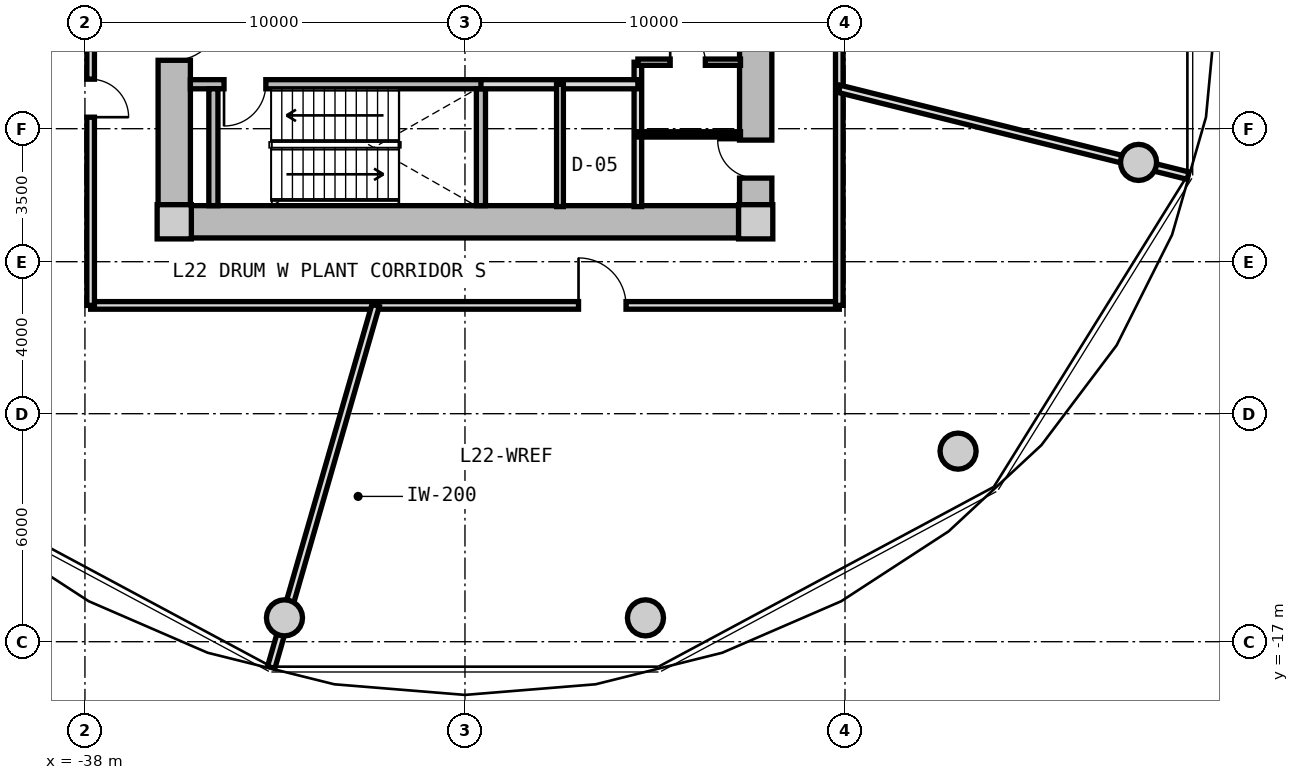
"""IFC4 building model, lengths in metres.
Left out: names, types, materials, properties, quantities, classifications, styles, units other than length and angle.
Written with IfcOpenShell. Run it as: python <this file> out.ifc"""

import sys

from ifc_helpers import new_model, si_unit, direction, frame, frame_2d, origin, origin_2d, place, context, subcontext, project, spatial, rectangle, circle, extrude, source, transform, mapped, element, fill, save


model = new_model("IFC4")
c1 = context("Model", 3, precision=1e-05, world=origin(), true_north=direction((0.0, 1.0)))
c2 = subcontext(c1, "Body", "Model", "MODEL_VIEW")
j1 = project(units=[si_unit("LENGTHUNIT", "METRE"), si_unit("PLANEANGLEUNIT", "RADIAN")], contexts=[c1])
p1 = place(None, origin())
s1 = spatial("IfcSite", under=j1, at=p1, CompositionType="ELEMENT")
p2 = place(p1, origin())
s2 = spatial("IfcBuilding", under=s1, at=p2, CompositionType="ELEMENT")
p3 = place(p2, frame((0.0, 0.0, 73.45)))
s3 = spatial("IfcBuildingStorey", under=s2, at=p3, CompositionType="ELEMENT", Elevation=73.45)
m1 = source(origin(), c2, "Body", "SweptSolid", [
    extrude(rectangle(XDim=0.9, YDim=0.9, at=origin_2d()), origin(), (0.0, 0.0, 1.0), 4.5),
])
for number, where, z_axis, x_axis in (
    (1, (-35.65, -5.95, 0.0), (0.0, 0.0, 1.0), (1.0, 0.0, 0.0)),
    (2, (-20.35, -5.95, 0.0), (0.0, 0.0, 1.0), (1.0, 0.0, 0.0)),
):
    element("IfcColumn", number, at=place(p3, frame(where, z_axis=z_axis, x_axis=x_axis)), inside=s3, PredefinedType="COLUMN", context=c2, shape_type="MappedRepresentation", body=[
        mapped(m1, transform((0.0, 0.0, 0.0), x_axis=(1.0, 0.0, 0.0), y_axis=(0.0, 1.0, 0.0), z_axis=(0.0, 0.0, 1.0), scale=1.0)),
    ])
m2 = source(origin(), c2, "Body", "SweptSolid", [
    extrude(rectangle(XDim=14.4, YDim=0.85, at=frame_2d((7.2, 0.0))), origin(), (0.0, 0.0, 1.0), 4.08),
])
p4 = place(p3, frame((-20.8, -5.95, 0.0), z_axis=(0.0, 0.0, 1.0), x_axis=(-1.0, 0.0, 0.0)))
e3 = element("IfcWall", 3, at=p4, inside=s3, PredefinedType="SHEAR", context=c2, shape_type="MappedRepresentation", body=[
    mapped(m2, transform((0.0, 0.0, 0.0), x_axis=(1.0, 0.0, 0.0), y_axis=(0.0, 1.0, 0.0), z_axis=(0.0, 0.0, 1.0), scale=1.0)),
])
m3 = source(origin(), c2, "Body", "SweptSolid", [
    extrude(rectangle(XDim=11.0, YDim=0.85, at=frame_2d((5.5, 0.0))), origin(), (0.0, 0.0, 1.0), 4.08),
])
p5 = place(p3, frame((-35.65, -5.5, 0.0), z_axis=(0.0, 0.0, 1.0), x_axis=(0.0, 1.0, 0.0)))
e4 = element("IfcWall", 4, at=p5, inside=s3, PredefinedType="SHEAR", context=c2, shape_type="MappedRepresentation", body=[
    mapped(m3, transform((0.0, 0.0, 0.0), x_axis=(1.0, 0.0, 0.0), y_axis=(0.0, 1.0, 0.0), z_axis=(0.0, 0.0, 1.0), scale=1.0)),
])
p6 = place(p5, frame((3.8, 0.0, 0.0)))
e5 = element("IfcOpeningElement", 5, at=p6, cuts=e4, PredefinedType="OPENING", context=c2, shape_type="SweptSolid", body=[
    extrude(rectangle(XDim=1.2, YDim=2.15, at=frame_2d((0.6, 1.075))), frame((0.0, 0.435, 0.0), z_axis=(0.0, -1.0, 0.0), x_axis=(1.0, 0.0, 0.0)), (0.0, 0.0, 1.0), 0.87),
])
p7 = place(p3, frame((-20.35, 5.5, 0.0), z_axis=(0.0, 0.0, 1.0), x_axis=(0.0, -1.0, 0.0)))
e6 = element("IfcWall", 6, at=p7, inside=s3, PredefinedType="SHEAR", context=c2, shape_type="MappedRepresentation", body=[
    mapped(m3, transform((0.0, 0.0, 0.0), x_axis=(1.0, 0.0, 0.0), y_axis=(0.0, 1.0, 0.0), z_axis=(0.0, 0.0, 1.0), scale=1.0)),
])
p8 = place(p7, frame((5.65, 0.0, 0.0)))
e7 = element("IfcOpeningElement", 7, at=p8, cuts=e6, PredefinedType="OPENING", context=c2, shape_type="SweptSolid", body=[
    extrude(rectangle(XDim=1.2, YDim=2.15, at=frame_2d((0.6, 1.075))), frame((0.0, 0.435, 0.0), z_axis=(0.0, -1.0, 0.0), x_axis=(1.0, 0.0, 0.0)), (0.0, 0.0, 1.0), 0.87),
])
p9 = place(p7, frame((9.3, 0.0, 0.0)))
e8 = element("IfcOpeningElement", 8, at=p9, cuts=e6, PredefinedType="OPENING", context=c2, shape_type="SweptSolid", body=[
    extrude(rectangle(XDim=1.0, YDim=2.1, at=frame_2d((0.5, 1.05))), frame((0.0, 0.435, 0.0), z_axis=(0.0, -1.0, 0.0), x_axis=(1.0, 0.0, 0.0)), (0.0, 0.0, 1.0), 0.87),
])
m4 = source(origin(), c2, "Body", "SweptSolid", [
    extrude(circle(Radius=0.475, at=origin_2d()), origin(), (0.0, 0.0, 1.0), 4.08),
])
for number, where, z_axis, x_axis in (
    (9, (-32.749, -16.373, 0.0), (0.0, 0.0, 1.0), (1.0, 0.0, 0.0)),
    (10, (-23.251, -16.373, 0.0), (0.0, 0.0, 1.0), (1.0, 0.0, 0.0)),
    (11, (-15.025, -11.985, 0.0), (0.0, 0.0, 1.0), (1.0, 0.0, 0.0)),
    (12, (-10.275, -4.387, 0.0), (0.0, 0.0, 1.0), (1.0, 0.0, 0.0)),
):
    element("IfcColumn", number, at=place(p3, frame(where, z_axis=z_axis, x_axis=x_axis)), inside=s3, PredefinedType="COLUMN", context=c2, shape_type="MappedRepresentation", body=[
        mapped(m4, transform((0.0, 0.0, 0.0), x_axis=(1.0, 0.0, 0.0), y_axis=(0.0, 1.0, 0.0), z_axis=(0.0, 0.0, 1.0), scale=1.0)),
    ])
m5 = source(origin(), c2, "Body", "SweptSolid", [
    extrude(rectangle(XDim=7.765, YDim=0.24, at=frame_2d((3.883, 0.0))), origin(), (0.0, 0.0, 1.0), 4.08),
])
p10 = place(p3, frame((-35.225, -2.33, 0.0), z_axis=(0.0, 0.0, 1.0), x_axis=(1.0, 0.0, 0.0)))
e13 = element("IfcWall", 13, at=p10, inside=s3, PredefinedType="PARTITIONING", context=c2, shape_type="MappedRepresentation", body=[
    mapped(m5, transform((0.0, 0.0, 0.0), x_axis=(1.0, 0.0, 0.0), y_axis=(0.0, 1.0, 0.0), z_axis=(0.0, 0.0, 1.0), scale=1.0)),
])
p11 = place(p10, frame((0.885, 0.0, 0.0)))
e14 = element("IfcOpeningElement", 14, at=p11, cuts=e13, PredefinedType="OPENING", context=c2, shape_type="SweptSolid", body=[
    extrude(rectangle(XDim=1.1, YDim=2.15, at=frame_2d((0.55, 1.075))), frame((0.0, 0.13, 0.0), z_axis=(0.0, -1.0, 0.0), x_axis=(1.0, 0.0, 0.0)), (0.0, 0.0, 1.0), 0.26),
])
m6 = source(origin(), c2, "Body", "SweptSolid", [
    extrude(rectangle(XDim=3.075, YDim=0.24, at=frame_2d((1.538, 0.0))), origin(), (0.0, 0.0, 1.0), 4.08),
])
for number, where, z_axis, x_axis in (
    (15, (-34.62, -5.525, 0.0), (0.0, 0.0, 1.0), (0.0, 1.0, 0.0)),
    (16, (-27.58, -5.525, 0.0), (0.0, 0.0, 1.0), (0.0, 1.0, 0.0)),
):
    element("IfcWall", number, at=place(p3, frame(where, z_axis=z_axis, x_axis=x_axis)), inside=s3, PredefinedType="PARTITIONING", context=c2, shape_type="MappedRepresentation", body=[
        mapped(m6, transform((0.0, 0.0, 0.0), x_axis=(1.0, 0.0, 0.0), y_axis=(0.0, 1.0, 0.0), z_axis=(0.0, 0.0, 1.0), scale=1.0)),
    ])
m7 = source(origin(), c2, "Body", "SweptSolid", [
    extrude(rectangle(XDim=3.8, YDim=0.2, at=frame_2d((1.9, 0.0))), origin(), (0.0, 0.0, 1.0), 4.065),
])
p12 = place(p3, frame((-23.45, -5.55, 0.0), z_axis=(0.0, 0.0, 1.0), x_axis=(0.0, 1.0, 0.0)))
e17 = element("IfcWall", 17, at=p12, inside=s3, PredefinedType="PARTITIONING", context=c2, shape_type="MappedRepresentation", body=[
    mapped(m7, transform((0.0, 0.0, 0.0), x_axis=(1.0, 0.0, 0.0), y_axis=(0.0, 1.0, 0.0), z_axis=(0.0, 0.0, 1.0), scale=1.0)),
])
m8 = source(origin(), c2, "Body", "SweptSolid", [
    extrude(rectangle(XDim=4.13, YDim=0.24, at=frame_2d((2.065, 0.0))), origin(), (0.0, 0.0, 1.0), 4.065),
])
p13 = place(p3, frame((-27.58, -2.33, 0.0), z_axis=(0.0, 0.0, 1.0), x_axis=(1.0, 0.0, 0.0)))
e18 = element("IfcWall", 18, at=p13, inside=s3, PredefinedType="PARTITIONING", context=c2, shape_type="MappedRepresentation", body=[
    mapped(m8, transform((0.0, 0.0, 0.0), x_axis=(1.0, 0.0, 0.0), y_axis=(0.0, 1.0, 0.0), z_axis=(0.0, 0.0, 1.0), scale=1.0)),
])
m9 = source(origin(), c2, "Body", "SweptSolid", [
    extrude(rectangle(XDim=3.22, YDim=0.18, at=frame_2d((1.61, 0.0))), origin(), (0.0, 0.0, 1.0), 4.065),
])
p14 = place(p3, frame((-25.5, -5.55, 0.0), z_axis=(0.0, 0.0, 1.0), x_axis=(0.0, 1.0, 0.0)))
e19 = element("IfcWall", 19, at=p14, inside=s3, PredefinedType="PARTITIONING", context=c2, shape_type="MappedRepresentation", body=[
    mapped(m9, transform((0.0, 0.0, 0.0), x_axis=(1.0, 0.0, 0.0), y_axis=(0.0, 1.0, 0.0), z_axis=(0.0, 0.0, 1.0), scale=1.0)),
])
m10 = source(origin(), c2, "Body", "SweptSolid", [
    extrude(rectangle(XDim=2.7, YDim=0.165, at=frame_2d((1.35, 0.0))), origin(), (0.0, 0.0, 1.0), 4.065),
])
p15 = place(p3, frame((-23.45, -1.75, 0.0), z_axis=(0.0, 0.0, 1.0), x_axis=(1.0, 0.0, 0.0)))
e20 = element("IfcWall", 20, at=p15, inside=s3, PredefinedType="PARTITIONING", context=c2, shape_type="MappedRepresentation", body=[
    mapped(m10, transform((0.0, 0.0, 0.0), x_axis=(1.0, 0.0, 0.0), y_axis=(0.0, 1.0, 0.0), z_axis=(0.0, 0.0, 1.0), scale=1.0)),
])
p16 = place(p15, frame((0.85, 0.0, 0.0)))
e21 = element("IfcOpeningElement", 21, at=p16, cuts=e20, PredefinedType="OPENING", context=c2, shape_type="SweptSolid", body=[
    extrude(rectangle(XDim=0.925, YDim=2.1, at=frame_2d((0.462, 1.05))), frame((0.0, 0.093, 0.0), z_axis=(0.0, -1.0, 0.0), x_axis=(1.0, 0.0, 0.0)), (0.0, 0.0, 1.0), 0.185),
])
m11 = source(origin(), c2, "Body", "SweptSolid", [
    extrude(rectangle(XDim=2.7, YDim=0.14, at=frame_2d((1.35, 0.0))), origin(), (0.0, 0.0, 1.0), 4.065),
])
p17 = place(p3, frame((-23.45, -3.65, 0.0), z_axis=(0.0, 0.0, 1.0), x_axis=(1.0, 0.0, 0.0)))
e22 = element("IfcWall", 22, at=p17, inside=s3, PredefinedType="PARTITIONING", context=c2, shape_type="MappedRepresentation", body=[
    mapped(m11, transform((0.0, 0.0, 0.0), x_axis=(1.0, 0.0, 0.0), y_axis=(0.0, 1.0, 0.0), z_axis=(0.0, 0.0, 1.0), scale=1.0)),
])
m12 = source(origin(), c2, "Body", "SweptSolid", [
    extrude(rectangle(XDim=19.7, YDim=0.2, at=frame_2d((9.85, 0.0))), origin(), (0.0, 0.0, 1.0), 4.065),
])
p18 = place(p3, frame((-18.15, -8.15, 0.0), z_axis=(0.0, 0.0, 1.0), x_axis=(-1.0, 0.0, 0.0)))
e23 = element("IfcWall", 23, at=p18, inside=s3, PredefinedType="PARTITIONING", context=c2, shape_type="MappedRepresentation", body=[
    mapped(m12, transform((0.0, 0.0, 0.0), x_axis=(1.0, 0.0, 0.0), y_axis=(0.0, 1.0, 0.0), z_axis=(0.0, 0.0, 1.0), scale=1.0)),
])
p19 = place(p18, frame((5.612, 0.0, 0.0)))
e24 = element("IfcOpeningElement", 24, at=p19, cuts=e23, PredefinedType="OPENING", context=c2, shape_type="SweptSolid", body=[
    extrude(rectangle(XDim=1.25, YDim=2.2, at=frame_2d((0.625, 1.1))), frame((0.0, 0.11, 0.0), z_axis=(0.0, -1.0, 0.0), x_axis=(1.0, 0.0, 0.0)), (0.0, 0.0, 1.0), 0.22),
])
m13 = source(origin(), c2, "Body", "SweptSolid", [
    extrude(rectangle(XDim=16.3, YDim=0.2, at=frame_2d((8.15, 0.0))), origin(), (0.0, 0.0, 1.0), 4.065),
])
p20 = place(p3, frame((-37.85, -8.15, 0.0), z_axis=(0.0, 0.0, 1.0), x_axis=(0.0, 1.0, 0.0)))
e25 = element("IfcWall", 25, at=p20, inside=s3, PredefinedType="PARTITIONING", context=c2, shape_type="MappedRepresentation", body=[
    mapped(m13, transform((0.0, 0.0, 0.0), x_axis=(1.0, 0.0, 0.0), y_axis=(0.0, 1.0, 0.0), z_axis=(0.0, 0.0, 1.0), scale=1.0)),
])
p21 = place(p20, frame((4.953, 0.0, 0.0)))
e26 = element("IfcOpeningElement", 26, at=p21, cuts=e25, PredefinedType="OPENING", context=c2, shape_type="SweptSolid", body=[
    extrude(rectangle(XDim=1.0, YDim=2.1, at=frame_2d((0.5, 1.05))), frame((0.0, 0.11, 0.0), z_axis=(0.0, -1.0, 0.0), x_axis=(1.0, 0.0, 0.0)), (0.0, 0.0, 1.0), 0.22),
])
p22 = place(p3, frame((-18.15, 8.15, 0.0), z_axis=(0.0, 0.0, 1.0), x_axis=(0.0, -1.0, 0.0)))
e27 = element("IfcWall", 27, at=p22, inside=s3, PredefinedType="PARTITIONING", context=c2, shape_type="MappedRepresentation", body=[
    mapped(m13, transform((0.0, 0.0, 0.0), x_axis=(1.0, 0.0, 0.0), y_axis=(0.0, 1.0, 0.0), z_axis=(0.0, 0.0, 1.0), scale=1.0)),
])
p23 = place(p22, frame((4.953, 0.0, 0.0)))
e28 = element("IfcOpeningElement", 28, at=p23, cuts=e27, PredefinedType="OPENING", context=c2, shape_type="SweptSolid", body=[
    extrude(rectangle(XDim=1.0, YDim=2.1, at=frame_2d((0.5, 1.05))), frame((0.0, 0.11, 0.0), z_axis=(0.0, -1.0, 0.0), x_axis=(1.0, 0.0, 0.0)), (0.0, 0.0, 1.0), 0.22),
])
m14 = source(origin(), c2, "Body", "SweptSolid", [
    extrude(rectangle(XDim=9.915, YDim=0.2, at=frame_2d((4.958, 0.0))), origin(), (0.0, 0.0, 1.0), 4.065),
])
p24 = place(p3, frame((-30.351, -8.15, 0.0), z_axis=(0.0, 0.0, 1.0), x_axis=(-0.277136607861, -0.960830526463, 0.0)))
e29 = element("IfcWall", 29, at=p24, inside=s3, PredefinedType="PARTITIONING", context=c2, shape_type="MappedRepresentation", body=[
    mapped(m14, transform((0.0, 0.0, 0.0), x_axis=(1.0, 0.0, 0.0), y_axis=(0.0, 1.0, 0.0), z_axis=(0.0, 0.0, 1.0), scale=1.0)),
])
m15 = source(origin(), c2, "Body", "SweptSolid", [
    extrude(rectangle(XDim=9.459, YDim=0.2, at=frame_2d((4.729, 0.0))), origin(), (0.0, 0.0, 1.0), 2.515),
])
p25 = place(p3, frame((-18.15, -2.452, 0.0), z_axis=(0.0, 0.0, 1.0), x_axis=(0.970390989268, -0.241539495626, 0.0)))
e30 = element("IfcWall", 30, at=p25, inside=s3, PredefinedType="PARTITIONING", context=c2, shape_type="MappedRepresentation", body=[
    mapped(m15, transform((0.0, 0.0, 0.0), x_axis=(1.0, 0.0, 0.0), y_axis=(0.0, 1.0, 0.0), z_axis=(0.0, 0.0, 1.0), scale=1.0)),
])
m16 = source(origin(), c2, "Body", "SweptSolid", [
    extrude(rectangle(XDim=1.1, YDim=2.15, at=frame_2d((0.55, 1.075))), frame((0.0, 0.025, 0.0), z_axis=(0.0, -1.0, 0.0), x_axis=(1.0, 0.0, 0.0)), (0.0, 0.0, 1.0), 0.05),
])
p26 = place(p11, frame((1.1, 0.0, 0.0), z_axis=(0.0, 0.0, 1.0), x_axis=(-1.0, 0.0, 0.0)))
e31 = element("IfcDoor", 31, at=p26, inside=s3, OperationType="SINGLE_SWING_RIGHT", PredefinedType="DOOR", context=c2, shape_type="MappedRepresentation", body=[
    mapped(m16, transform((0.0, 0.0, 0.0), x_axis=(1.0, 0.0, 0.0), y_axis=(0.0, 1.0, 0.0), z_axis=(0.0, 0.0, 1.0), scale=1.0)),
])
fill(e14, e31)
m17 = source(origin(), c2, "Body", "SweptSolid", [
    extrude(rectangle(XDim=1.2, YDim=2.15, at=frame_2d((0.6, 1.075))), frame((0.0, 0.025, 0.0), z_axis=(0.0, -1.0, 0.0), x_axis=(1.0, 0.0, 0.0)), (0.0, 0.0, 1.0), 0.05),
])
p27 = place(p6, frame((1.2, 0.0, 0.0), z_axis=(0.0, 0.0, 1.0), x_axis=(-1.0, 0.0, 0.0)))
e32 = element("IfcDoor", 32, at=p27, inside=s3, OperationType="SINGLE_SWING_LEFT", PredefinedType="DOOR", context=c2, shape_type="MappedRepresentation", body=[
    mapped(m17, transform((0.0, 0.0, 0.0), x_axis=(1.0, 0.0, 0.0), y_axis=(0.0, 1.0, 0.0), z_axis=(0.0, 0.0, 1.0), scale=1.0)),
])
fill(e5, e32)
m18 = source(origin(), c2, "Body", "SweptSolid", [
    extrude(rectangle(XDim=0.925, YDim=2.1, at=frame_2d((0.462, 1.05))), frame((0.0, 0.025, 0.0), z_axis=(0.0, -1.0, 0.0), x_axis=(1.0, 0.0, 0.0)), (0.0, 0.0, 1.0), 0.05),
])
p28 = place(p16, origin())
e33 = element("IfcDoor", 33, at=p28, inside=s3, OperationType="SINGLE_SWING_LEFT", PredefinedType="DOOR", context=c2, shape_type="MappedRepresentation", body=[
    mapped(m18, transform((0.0, 0.0, 0.0), x_axis=(1.0, 0.0, 0.0), y_axis=(0.0, 1.0, 0.0), z_axis=(0.0, 0.0, 1.0), scale=1.0)),
])
fill(e21, e33)
m19 = source(origin(), c2, "Body", "SweptSolid", [
    extrude(rectangle(XDim=1.0, YDim=2.1, at=frame_2d((0.5, 1.05))), frame((0.0, 0.025, 0.0), z_axis=(0.0, -1.0, 0.0), x_axis=(1.0, 0.0, 0.0)), (0.0, 0.0, 1.0), 0.05),
])
p29 = place(p9, frame((1.0, 0.0, 0.0), z_axis=(0.0, 0.0, 1.0), x_axis=(-1.0, 0.0, 0.0)))
e34 = element("IfcDoor", 34, at=p29, inside=s3, OperationType="SINGLE_SWING_RIGHT", PredefinedType="DOOR", context=c2, shape_type="MappedRepresentation", body=[
    mapped(m19, transform((0.0, 0.0, 0.0), x_axis=(1.0, 0.0, 0.0), y_axis=(0.0, 1.0, 0.0), z_axis=(0.0, 0.0, 1.0), scale=1.0)),
])
fill(e8, e34)
m20 = source(origin(), c2, "Body", "SweptSolid", [
    extrude(rectangle(XDim=1.25, YDim=2.2, at=frame_2d((0.625, 1.1))), frame((0.0, 0.025, 0.0), z_axis=(0.0, -1.0, 0.0), x_axis=(1.0, 0.0, 0.0)), (0.0, 0.0, 1.0), 0.05),
])
p30 = place(p19, frame((1.25, 0.0, 0.0), z_axis=(0.0, 0.0, 1.0), x_axis=(-1.0, 0.0, 0.0)))
e35 = element("IfcDoor", 35, at=p30, inside=s3, OperationType="SINGLE_SWING_LEFT", PredefinedType="DOOR", context=c2, shape_type="MappedRepresentation", body=[
    mapped(m20, transform((0.0, 0.0, 0.0), x_axis=(1.0, 0.0, 0.0), y_axis=(0.0, 1.0, 0.0), z_axis=(0.0, 0.0, 1.0), scale=1.0)),
])
fill(e24, e35)
p31 = place(p21, frame((1.0, 0.0, 0.0), z_axis=(0.0, 0.0, 1.0), x_axis=(-1.0, 0.0, 0.0)))
e36 = element("IfcDoor", 36, at=p31, inside=s3, OperationType="SINGLE_SWING_RIGHT", PredefinedType="DOOR", context=c2, shape_type="MappedRepresentation", body=[
    mapped(m19, transform((0.0, 0.0, 0.0), x_axis=(1.0, 0.0, 0.0), y_axis=(0.0, 1.0, 0.0), z_axis=(0.0, 0.0, 1.0), scale=1.0)),
])
fill(e26, e36)
save(model, sys.argv[1])
